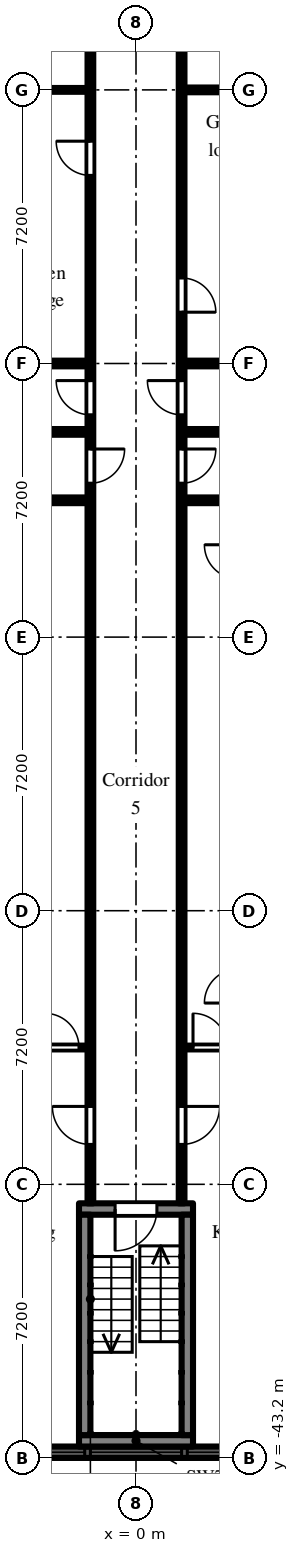
"""IFC4 building model, lengths in metres.
Left out: names, types, materials, properties, quantities, classifications, styles, units other than length and angle.
Written with IfcOpenShell. Run it as: python <this file> out.ifc"""

import sys

from ifc_helpers import new_model, si_unit, direction, frame, frame_2d, origin, place, context, subcontext, project, spatial, rectangle, extrude, element, fill, save


model = new_model("IFC4")
c1 = context("Model", 3, precision=1e-05, world=origin(), true_north=direction((0.0, 1.0)))
c2 = subcontext(c1, "Body", "Model", "MODEL_VIEW")
j1 = project(units=[si_unit("LENGTHUNIT", "METRE"), si_unit("PLANEANGLEUNIT", "RADIAN")], contexts=[c1])
p1 = place(None, origin())
s1 = spatial("IfcSite", under=j1, at=p1, CompositionType="ELEMENT")
p2 = place(p1, origin())
s2 = spatial("IfcBuilding", under=s1, at=p2, CompositionType="ELEMENT")
p3 = place(p2, frame((0.0, 0.0, 102.9)))
s3 = spatial("IfcBuildingStorey", under=s2, at=p3, CompositionType="ELEMENT", Elevation=102.9)
p4 = place(p3, frame((-2.7, -43.05, 0.0), z_axis=(0.0, 0.0, 1.0), x_axis=(1.0, 0.0, 0.0)))
e1 = element("IfcWall", 1, at=p4, inside=s3, PredefinedType="SOLIDWALL", context=c2, shape_type="SweptSolid", body=[
    extrude(rectangle(XDim=5.4, YDim=0.3, at=frame_2d((2.7, 0.0))), origin(), (0.0, 0.0, 1.0), 2.1),
])
p5 = place(p4, frame((1.5, 0.0, 0.2)))
e2 = element("IfcOpeningElement", 2, at=p5, cuts=e1, PredefinedType="OPENING", context=c2, shape_type="SweptSolid", body=[
    extrude(rectangle(XDim=2.4, YDim=1.85, at=frame_2d((1.2, 0.925))), frame((0.0, 0.16, 0.0), z_axis=(0.0, -1.0, 0.0), x_axis=(1.0, 0.0, 0.0)), (0.0, 0.0, 1.0), 0.32),
])
p6 = place(p4, frame((0.15, 0.0, 0.2)))
e3 = element("IfcOpeningElement", 3, at=p6, cuts=e1, PredefinedType="OPENING", context=c2, shape_type="SweptSolid", body=[
    extrude(rectangle(XDim=1.2, YDim=1.85, at=frame_2d((0.6, 0.925))), frame((0.0, 0.16, 0.0), z_axis=(0.0, -1.0, 0.0), x_axis=(1.0, 0.0, 0.0)), (0.0, 0.0, 1.0), 0.32),
])
p7 = place(p4, frame((4.05, 0.0, 0.2)))
e4 = element("IfcOpeningElement", 4, at=p7, cuts=e1, PredefinedType="OPENING", context=c2, shape_type="SweptSolid", body=[
    extrude(rectangle(XDim=1.2, YDim=1.85, at=frame_2d((0.6, 0.925))), frame((0.0, 0.16, 0.0), z_axis=(0.0, -1.0, 0.0), x_axis=(1.0, 0.0, 0.0)), (0.0, 0.0, 1.0), 0.32),
])
p8 = place(p3, frame((-1.5, -36.65, 0.0), z_axis=(0.0, 0.0, 1.0), x_axis=(1.0, 0.0, 0.0)))
e5 = element("IfcWall", 5, at=p8, inside=s3, PredefinedType="SHEAR", context=c2, shape_type="SweptSolid", body=[
    extrude(rectangle(XDim=3.0, YDim=0.3, at=frame_2d((1.5, 0.0))), origin(), (0.0, 0.0, 1.0), 2.575),
])
p9 = place(p8, frame((0.95, 0.0, 0.0)))
e6 = element("IfcOpeningElement", 6, at=p9, cuts=e5, PredefinedType="OPENING", context=c2, shape_type="SweptSolid", body=[
    extrude(rectangle(XDim=1.1, YDim=2.1, at=frame_2d((0.55, 1.05))), frame((0.0, 0.16, 0.0), z_axis=(0.0, -1.0, 0.0), x_axis=(1.0, 0.0, 0.0)), (0.0, 0.0, 1.0), 0.32),
])
p10 = place(p3, frame((-1.5, -42.75, 0.0), z_axis=(0.0, 0.0, 1.0), x_axis=(1.0, 0.0, 0.0)))
e7 = element("IfcWall", 7, at=p10, inside=s3, PredefinedType="SHEAR", context=c2, shape_type="SweptSolid", body=[
    extrude(rectangle(XDim=3.0, YDim=0.3, at=frame_2d((1.5, 0.0))), origin(), (0.0, 0.0, 1.0), 2.575),
])
for number, where, z_axis, x_axis in (
    (8, (-1.35, -36.8, 0.0), (0.0, 0.0, 1.0), (0.0, -1.0, 0.0)),
    (9, (1.35, -36.8, 0.0), (0.0, 0.0, 1.0), (0.0, -1.0, 0.0)),
):
    element("IfcWall", number, at=place(p3, frame(where, z_axis=z_axis, x_axis=x_axis)), inside=s3, PredefinedType="SHEAR", context=c2, shape_type="SweptSolid", body=[
        extrude(rectangle(XDim=5.8, YDim=0.3, at=frame_2d((2.9, 0.0))), origin(), (0.0, 0.0, 1.0), 2.575),
    ])
p11 = place(p3, frame((-6.9, -32.4, 0.0), z_axis=(0.0, 0.0, 1.0), x_axis=(1.0, 0.0, 0.0)))
e10 = element("IfcWall", 10, at=p11, inside=s3, PredefinedType="PARTITIONING", context=c2, shape_type="SweptSolid", body=[
    extrude(rectangle(XDim=5.625, YDim=0.1, at=frame_2d((2.812, 0.0))), origin(), (0.0, 0.0, 1.0), 2.575),
])
p12 = place(p11, frame((4.5, 0.0, 0.0)))
e11 = element("IfcOpeningElement", 11, at=p12, cuts=e10, PredefinedType="OPENING", context=c2, shape_type="SweptSolid", body=[
    extrude(rectangle(XDim=0.9, YDim=2.1, at=frame_2d((0.45, 1.05))), frame((0.0, 0.06, 0.0), z_axis=(0.0, -1.0, 0.0), x_axis=(1.0, 0.0, 0.0)), (0.0, 0.0, 1.0), 0.12),
])
for number, where, z_axis, x_axis in (
    (12, (-6.9, -18.0, 0.0), (0.0, 0.0, 1.0), (1.0, 0.0, 0.0)),
    (13, (-6.9, -16.2, 0.0), (0.0, 0.0, 1.0), (1.0, 0.0, 0.0)),
):
    element("IfcWall", number, at=place(p3, frame(where, z_axis=z_axis, x_axis=x_axis)), inside=s3, PredefinedType="PARTITIONING", context=c2, shape_type="SweptSolid", body=[
        extrude(rectangle(XDim=5.625, YDim=0.15, at=frame_2d((2.812, 0.0))), origin(), (0.0, 0.0, 1.0), 2.575),
    ])
p13 = place(p3, frame((-3.9, -14.4, 0.0), z_axis=(0.0, 0.0, 1.0), x_axis=(1.0, 0.0, 0.0)))
e14 = element("IfcWall", 14, at=p13, inside=s3, PredefinedType="PARTITIONING", context=c2, shape_type="SweptSolid", body=[
    extrude(rectangle(XDim=2.625, YDim=0.15, at=frame_2d((1.312, 0.0))), origin(), (0.0, 0.0, 1.0), 2.575),
])
p14 = place(p3, frame((-3.9, -7.2, 0.0), z_axis=(0.0, 0.0, 1.0), x_axis=(1.0, 0.0, 0.0)))
e15 = element("IfcWall", 15, at=p14, inside=s3, PredefinedType="PARTITIONING", context=c2, shape_type="SweptSolid", body=[
    extrude(rectangle(XDim=2.625, YDim=0.1, at=frame_2d((1.312, 0.0))), origin(), (0.0, 0.0, 1.0), 2.575),
])
p15 = place(p3, frame((-1.2, -36.5, 0.0), z_axis=(0.0, 0.0, 1.0), x_axis=(0.0, 1.0, 0.0)))
e16 = element("IfcWall", 16, at=p15, inside=s3, PredefinedType="PARTITIONING", context=c2, shape_type="SweptSolid", body=[
    extrude(rectangle(XDim=35.225, YDim=0.15, at=frame_2d((17.613, 0.0))), origin(), (0.0, 0.0, 1.0), 2.575),
])
p16 = place(p15, frame((31.85, 0.0, 0.0)))
e17 = element("IfcOpeningElement", 17, at=p16, cuts=e16, PredefinedType="OPENING", context=c2, shape_type="SweptSolid", body=[
    extrude(rectangle(XDim=0.9, YDim=2.1, at=frame_2d((0.45, 1.05))), frame((0.0, 0.085, 0.0), z_axis=(0.0, -1.0, 0.0), x_axis=(1.0, 0.0, 0.0)), (0.0, 0.0, 1.0), 0.17),
])
p17 = place(p15, frame((27.05, 0.0, 0.0)))
e18 = element("IfcOpeningElement", 18, at=p17, cuts=e16, PredefinedType="OPENING", context=c2, shape_type="SweptSolid", body=[
    extrude(rectangle(XDim=0.9, YDim=2.1, at=frame_2d((0.45, 1.05))), frame((0.0, 0.085, 0.0), z_axis=(0.0, -1.0, 0.0), x_axis=(1.0, 0.0, 0.0)), (0.0, 0.0, 1.0), 0.17),
])
p18 = place(p15, frame((20.75, 0.0, 0.0)))
e19 = element("IfcOpeningElement", 19, at=p18, cuts=e16, PredefinedType="OPENING", context=c2, shape_type="SweptSolid", body=[
    extrude(rectangle(XDim=0.9, YDim=2.1, at=frame_2d((0.45, 1.05))), frame((0.0, 0.085, 0.0), z_axis=(0.0, -1.0, 0.0), x_axis=(1.0, 0.0, 0.0)), (0.0, 0.0, 1.0), 0.17),
])
p19 = place(p15, frame((18.95, 0.0, 0.0)))
e20 = element("IfcOpeningElement", 20, at=p19, cuts=e16, PredefinedType="OPENING", context=c2, shape_type="SweptSolid", body=[
    extrude(rectangle(XDim=0.9, YDim=2.1, at=frame_2d((0.45, 1.05))), frame((0.0, 0.085, 0.0), z_axis=(0.0, -1.0, 0.0), x_axis=(1.0, 0.0, 0.0)), (0.0, 0.0, 1.0), 0.17),
])
p20 = place(p15, frame((1.55, 0.0, 0.0)))
e21 = element("IfcOpeningElement", 21, at=p20, cuts=e16, PredefinedType="OPENING", context=c2, shape_type="SweptSolid", body=[
    extrude(rectangle(XDim=1.0, YDim=2.1, at=frame_2d((0.5, 1.05))), frame((0.0, 0.085, 0.0), z_axis=(0.0, -1.0, 0.0), x_axis=(1.0, 0.0, 0.0)), (0.0, 0.0, 1.0), 0.17),
])
p21 = place(p3, frame((1.2, -36.5, 0.0), z_axis=(0.0, 0.0, 1.0), x_axis=(0.0, 1.0, 0.0)))
e22 = element("IfcWall", 22, at=p21, inside=s3, PredefinedType="PARTITIONING", context=c2, shape_type="SweptSolid", body=[
    extrude(rectangle(XDim=35.375, YDim=0.15, at=frame_2d((17.688, 0.0))), origin(), (0.0, 0.0, 1.0), 2.575),
])
p22 = place(p21, frame((33.65, 0.0, 0.0)))
e23 = element("IfcOpeningElement", 23, at=p22, cuts=e22, PredefinedType="OPENING", context=c2, shape_type="SweptSolid", body=[
    extrude(rectangle(XDim=0.9, YDim=2.1, at=frame_2d((0.45, 1.05))), frame((0.0, 0.085, 0.0), z_axis=(0.0, -1.0, 0.0), x_axis=(1.0, 0.0, 0.0)), (0.0, 0.0, 1.0), 0.17),
])
p23 = place(p21, frame((30.65, 0.0, 0.0)))
e24 = element("IfcOpeningElement", 24, at=p23, cuts=e22, PredefinedType="OPENING", context=c2, shape_type="SweptSolid", body=[
    extrude(rectangle(XDim=0.9, YDim=2.1, at=frame_2d((0.45, 1.05))), frame((0.0, 0.085, 0.0), z_axis=(0.0, -1.0, 0.0), x_axis=(1.0, 0.0, 0.0)), (0.0, 0.0, 1.0), 0.17),
])
p24 = place(p21, frame((23.45, 0.0, 0.0)))
e25 = element("IfcOpeningElement", 25, at=p24, cuts=e22, PredefinedType="OPENING", context=c2, shape_type="SweptSolid", body=[
    extrude(rectangle(XDim=0.9, YDim=2.1, at=frame_2d((0.45, 1.05))), frame((0.0, 0.085, 0.0), z_axis=(0.0, -1.0, 0.0), x_axis=(1.0, 0.0, 0.0)), (0.0, 0.0, 1.0), 0.17),
])
p25 = place(p21, frame((20.75, 0.0, 0.0)))
e26 = element("IfcOpeningElement", 26, at=p25, cuts=e22, PredefinedType="OPENING", context=c2, shape_type="SweptSolid", body=[
    extrude(rectangle(XDim=0.9, YDim=2.1, at=frame_2d((0.45, 1.05))), frame((0.0, 0.085, 0.0), z_axis=(0.0, -1.0, 0.0), x_axis=(1.0, 0.0, 0.0)), (0.0, 0.0, 1.0), 0.17),
])
p26 = place(p21, frame((18.95, 0.0, 0.0)))
e27 = element("IfcOpeningElement", 27, at=p26, cuts=e22, PredefinedType="OPENING", context=c2, shape_type="SweptSolid", body=[
    extrude(rectangle(XDim=0.9, YDim=2.1, at=frame_2d((0.45, 1.05))), frame((0.0, 0.085, 0.0), z_axis=(0.0, -1.0, 0.0), x_axis=(1.0, 0.0, 0.0)), (0.0, 0.0, 1.0), 0.17),
])
p27 = place(p21, frame((1.55, 0.0, 0.0)))
e28 = element("IfcOpeningElement", 28, at=p27, cuts=e22, PredefinedType="OPENING", context=c2, shape_type="SweptSolid", body=[
    extrude(rectangle(XDim=1.0, YDim=2.1, at=frame_2d((0.5, 1.05))), frame((0.0, 0.085, 0.0), z_axis=(0.0, -1.0, 0.0), x_axis=(1.0, 0.0, 0.0)), (0.0, 0.0, 1.0), 0.17),
])
p28 = place(p3, frame((1.275, -32.4, 0.0), z_axis=(0.0, 0.0, 1.0), x_axis=(1.0, 0.0, 0.0)))
e29 = element("IfcWall", 29, at=p28, inside=s3, PredefinedType="PARTITIONING", context=c2, shape_type="SweptSolid", body=[
    extrude(rectangle(XDim=5.625, YDim=0.1, at=frame_2d((2.812, 0.0))), origin(), (0.0, 0.0, 1.0), 2.575),
])
p29 = place(p28, frame((0.225, 0.0, 0.0)))
e30 = element("IfcOpeningElement", 30, at=p29, cuts=e29, PredefinedType="OPENING", context=c2, shape_type="SweptSolid", body=[
    extrude(rectangle(XDim=0.9, YDim=2.1, at=frame_2d((0.45, 1.05))), frame((0.0, 0.06, 0.0), z_axis=(0.0, -1.0, 0.0), x_axis=(1.0, 0.0, 0.0)), (0.0, 0.0, 1.0), 0.12),
])
for number, where, z_axis, x_axis in (
    (31, (1.275, -18.0, 0.0), (0.0, 0.0, 1.0), (1.0, 0.0, 0.0)),
    (32, (1.275, -16.2, 0.0), (0.0, 0.0, 1.0), (1.0, 0.0, 0.0)),
):
    element("IfcWall", number, at=place(p3, frame(where, z_axis=z_axis, x_axis=x_axis)), inside=s3, PredefinedType="PARTITIONING", context=c2, shape_type="SweptSolid", body=[
        extrude(rectangle(XDim=5.625, YDim=0.15, at=frame_2d((2.812, 0.0))), origin(), (0.0, 0.0, 1.0), 2.575),
    ])
p30 = place(p3, frame((1.275, -14.4, 0.0), z_axis=(0.0, 0.0, 1.0), x_axis=(1.0, 0.0, 0.0)))
e33 = element("IfcWall", 33, at=p30, inside=s3, PredefinedType="PARTITIONING", context=c2, shape_type="SweptSolid", body=[
    extrude(rectangle(XDim=2.625, YDim=0.15, at=frame_2d((1.312, 0.0))), origin(), (0.0, 0.0, 1.0), 2.575),
])
p31 = place(p3, frame((1.275, -7.2, 0.0), z_axis=(0.0, 0.0, 1.0), x_axis=(1.0, 0.0, 0.0)))
e34 = element("IfcWall", 34, at=p31, inside=s3, PredefinedType="PARTITIONING", context=c2, shape_type="SweptSolid", body=[
    extrude(rectangle(XDim=2.625, YDim=0.125, at=frame_2d((1.312, 0.0))), origin(), (0.0, 0.0, 1.0), 2.575),
])
p32 = place(p5, origin())
e35 = element("IfcWindow", 35, at=p32, inside=s3, PartitioningType="SINGLE_PANEL", PredefinedType="WINDOW", context=c2, shape_type="SweptSolid", body=[
    extrude(rectangle(XDim=2.4, YDim=1.85, at=frame_2d((1.2, 0.925))), frame((0.0, 0.03, 0.0), z_axis=(0.0, -1.0, 0.0), x_axis=(1.0, 0.0, 0.0)), (0.0, 0.0, 1.0), 0.06),
])
fill(e2, e35)
p33 = place(p6, origin())
e36 = element("IfcWindow", 36, at=p33, inside=s3, PartitioningType="SINGLE_PANEL", PredefinedType="WINDOW", context=c2, shape_type="SweptSolid", body=[
    extrude(rectangle(XDim=1.2, YDim=1.85, at=frame_2d((0.6, 0.925))), frame((0.0, 0.03, 0.0), z_axis=(0.0, -1.0, 0.0), x_axis=(1.0, 0.0, 0.0)), (0.0, 0.0, 1.0), 0.06),
])
fill(e3, e36)
p34 = place(p7, origin())
e37 = element("IfcWindow", 37, at=p34, inside=s3, PartitioningType="SINGLE_PANEL", PredefinedType="WINDOW", context=c2, shape_type="SweptSolid", body=[
    extrude(rectangle(XDim=1.2, YDim=1.85, at=frame_2d((0.6, 0.925))), frame((0.0, 0.03, 0.0), z_axis=(0.0, -1.0, 0.0), x_axis=(1.0, 0.0, 0.0)), (0.0, 0.0, 1.0), 0.06),
])
fill(e4, e37)
p35 = place(p9, frame((1.1, 0.0, 0.0), z_axis=(0.0, 0.0, 1.0), x_axis=(-1.0, 0.0, 0.0)))
e38 = element("IfcDoor", 38, at=p35, inside=s3, OperationType="SINGLE_SWING_RIGHT", PredefinedType="DOOR", context=c2, shape_type="SweptSolid", body=[
    extrude(rectangle(XDim=1.1, YDim=2.1, at=frame_2d((0.55, 1.05))), frame((0.0, 0.025, 0.0), z_axis=(0.0, -1.0, 0.0), x_axis=(1.0, 0.0, 0.0)), (0.0, 0.0, 1.0), 0.05),
])
fill(e6, e38)
p36 = place(p24, frame((0.9, 0.0, 0.0), z_axis=(0.0, 0.0, 1.0), x_axis=(-1.0, 0.0, 0.0)))
e39 = element("IfcDoor", 39, at=p36, inside=s3, OperationType="SINGLE_SWING_RIGHT", PredefinedType="DOOR", context=c2, shape_type="SweptSolid", body=[
    extrude(rectangle(XDim=0.9, YDim=2.1, at=frame_2d((0.45, 1.05))), frame((0.0, 0.025, 0.0), z_axis=(0.0, -1.0, 0.0), x_axis=(1.0, 0.0, 0.0)), (0.0, 0.0, 1.0), 0.05),
])
fill(e25, e39)
p37 = place(p25, origin())
e40 = element("IfcDoor", 40, at=p37, inside=s3, OperationType="SINGLE_SWING_RIGHT", PredefinedType="DOOR", context=c2, shape_type="SweptSolid", body=[
    extrude(rectangle(XDim=0.9, YDim=2.1, at=frame_2d((0.45, 1.05))), frame((0.0, 0.025, 0.0), z_axis=(0.0, -1.0, 0.0), x_axis=(1.0, 0.0, 0.0)), (0.0, 0.0, 1.0), 0.05),
])
fill(e26, e40)
p38 = place(p26, frame((0.9, 0.0, 0.0), z_axis=(0.0, 0.0, 1.0), x_axis=(-1.0, 0.0, 0.0)))
e41 = element("IfcDoor", 41, at=p38, inside=s3, OperationType="SINGLE_SWING_LEFT", PredefinedType="DOOR", context=c2, shape_type="SweptSolid", body=[
    extrude(rectangle(XDim=0.9, YDim=2.1, at=frame_2d((0.45, 1.05))), frame((0.0, 0.025, 0.0), z_axis=(0.0, -1.0, 0.0), x_axis=(1.0, 0.0, 0.0)), (0.0, 0.0, 1.0), 0.05),
])
fill(e27, e41)
p39 = place(p27, frame((1.0, 0.0, 0.0), z_axis=(0.0, 0.0, 1.0), x_axis=(-1.0, 0.0, 0.0)))
e42 = element("IfcDoor", 42, at=p39, inside=s3, OperationType="SINGLE_SWING_LEFT", PredefinedType="DOOR", context=c2, shape_type="SweptSolid", body=[
    extrude(rectangle(XDim=1.0, YDim=2.1, at=frame_2d((0.5, 1.05))), frame((0.0, 0.025, 0.0), z_axis=(0.0, -1.0, 0.0), x_axis=(1.0, 0.0, 0.0)), (0.0, 0.0, 1.0), 0.05),
])
fill(e28, e42)
p40 = place(p29, origin())
e43 = element("IfcDoor", 43, at=p40, inside=s3, OperationType="SINGLE_SWING_LEFT", PredefinedType="DOOR", context=c2, shape_type="SweptSolid", body=[
    extrude(rectangle(XDim=0.9, YDim=2.1, at=frame_2d((0.45, 1.05))), frame((0.0, 0.025, 0.0), z_axis=(0.0, -1.0, 0.0), x_axis=(1.0, 0.0, 0.0)), (0.0, 0.0, 1.0), 0.05),
])
fill(e30, e43)
p41 = place(p17, origin())
e44 = element("IfcDoor", 44, at=p41, inside=s3, OperationType="SINGLE_SWING_RIGHT", PredefinedType="DOOR", context=c2, shape_type="SweptSolid", body=[
    extrude(rectangle(XDim=0.9, YDim=2.1, at=frame_2d((0.45, 1.05))), frame((0.0, 0.025, 0.0), z_axis=(0.0, -1.0, 0.0), x_axis=(1.0, 0.0, 0.0)), (0.0, 0.0, 1.0), 0.05),
])
fill(e18, e44)
p42 = place(p18, origin())
e45 = element("IfcDoor", 45, at=p42, inside=s3, OperationType="SINGLE_SWING_RIGHT", PredefinedType="DOOR", context=c2, shape_type="SweptSolid", body=[
    extrude(rectangle(XDim=0.9, YDim=2.1, at=frame_2d((0.45, 1.05))), frame((0.0, 0.025, 0.0), z_axis=(0.0, -1.0, 0.0), x_axis=(1.0, 0.0, 0.0)), (0.0, 0.0, 1.0), 0.05),
])
fill(e19, e45)
p43 = place(p19, frame((0.9, 0.0, 0.0), z_axis=(0.0, 0.0, 1.0), x_axis=(-1.0, 0.0, 0.0)))
e46 = element("IfcDoor", 46, at=p43, inside=s3, OperationType="SINGLE_SWING_LEFT", PredefinedType="DOOR", context=c2, shape_type="SweptSolid", body=[
    extrude(rectangle(XDim=0.9, YDim=2.1, at=frame_2d((0.45, 1.05))), frame((0.0, 0.025, 0.0), z_axis=(0.0, -1.0, 0.0), x_axis=(1.0, 0.0, 0.0)), (0.0, 0.0, 1.0), 0.05),
])
fill(e20, e46)
p44 = place(p20, origin())
e47 = element("IfcDoor", 47, at=p44, inside=s3, OperationType="SINGLE_SWING_RIGHT", PredefinedType="DOOR", context=c2, shape_type="SweptSolid", body=[
    extrude(rectangle(XDim=1.0, YDim=2.1, at=frame_2d((0.5, 1.05))), frame((0.0, 0.025, 0.0), z_axis=(0.0, -1.0, 0.0), x_axis=(1.0, 0.0, 0.0)), (0.0, 0.0, 1.0), 0.05),
])
fill(e21, e47)
p45 = place(p12, origin())
e48 = element("IfcDoor", 48, at=p45, inside=s3, OperationType="SINGLE_SWING_LEFT", PredefinedType="DOOR", context=c2, shape_type="SweptSolid", body=[
    extrude(rectangle(XDim=0.9, YDim=2.1, at=frame_2d((0.45, 1.05))), frame((0.0, 0.025, 0.0), z_axis=(0.0, -1.0, 0.0), x_axis=(1.0, 0.0, 0.0)), (0.0, 0.0, 1.0), 0.05),
])
fill(e11, e48)
save(model, sys.argv[1])
